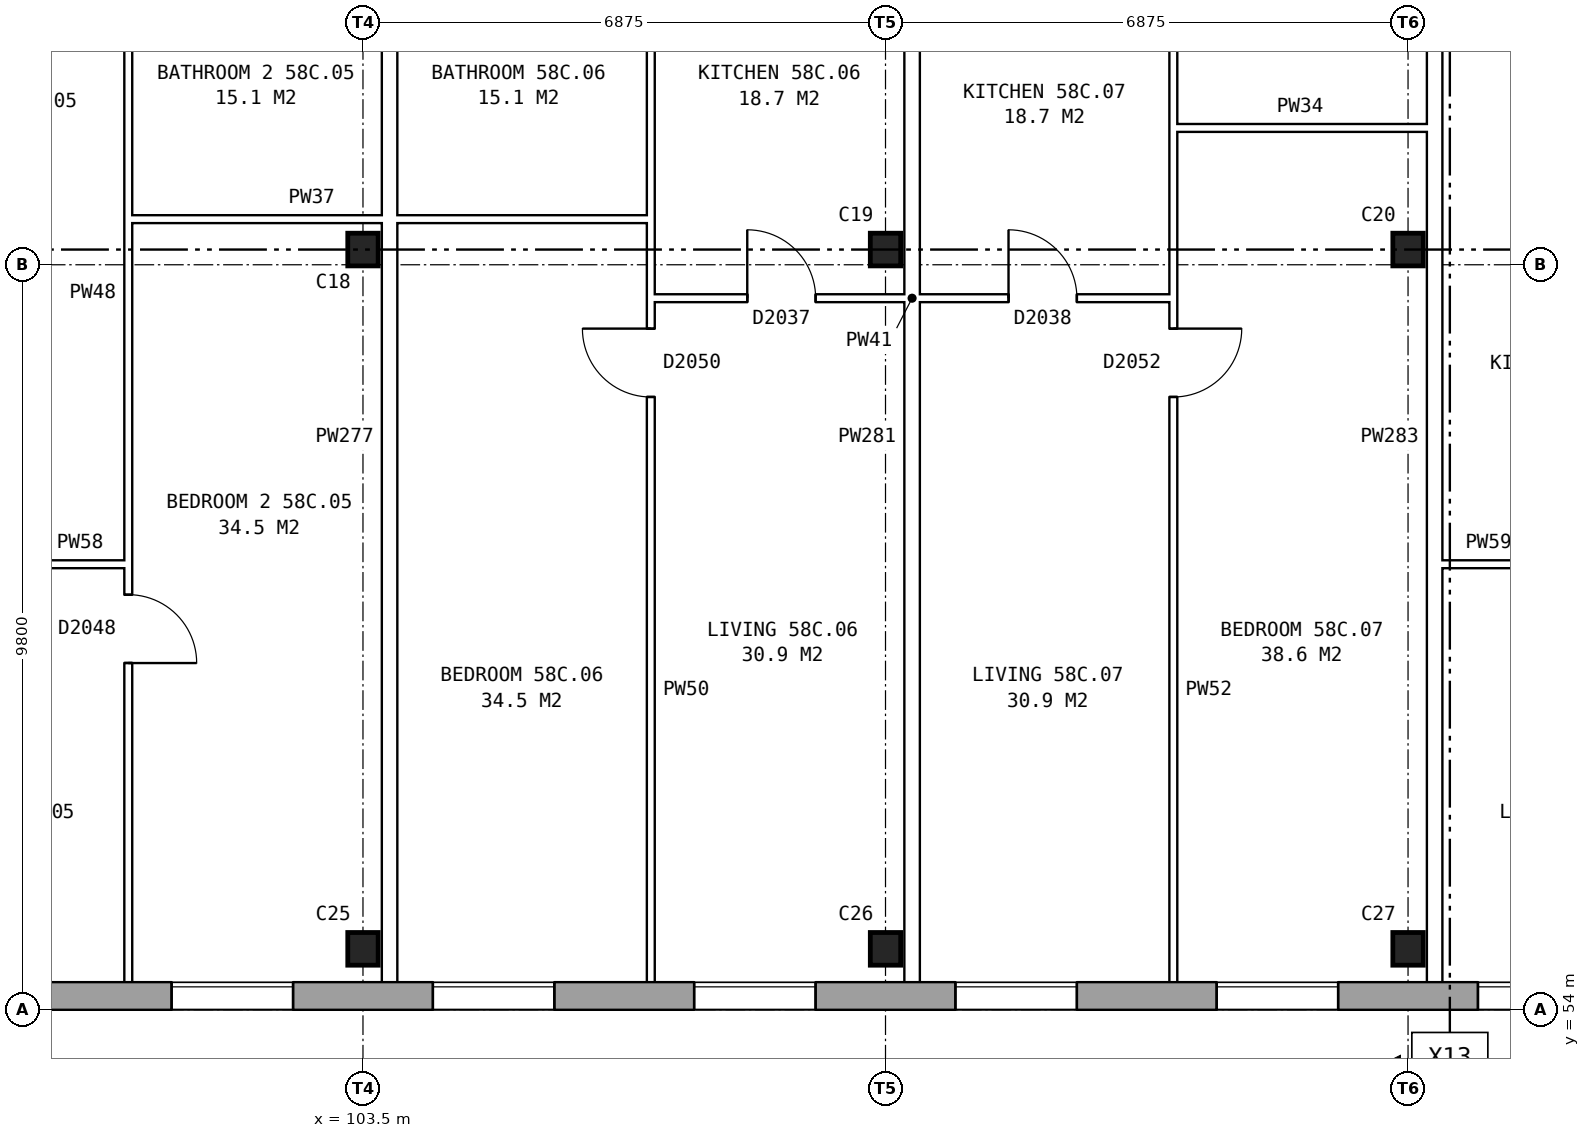
"""IFC4 building model, lengths in metres.
Left out: names, types, materials, properties, quantities, classifications, styles, units other than length and angle.
Written with IfcOpenShell. Run it as: python <this file> out.ifc"""

import sys

from ifc_helpers import new_model, si_unit, direction, frame, frame_2d, origin, origin_2d, place, context, subcontext, project, spatial, rectangle, i_section, extrude, element, fill, save


model = new_model("IFC4")
c1 = context("Model", 3, precision=1e-05, world=origin(), true_north=direction((0.0, 1.0)))
c2 = subcontext(c1, "Body", "Model", "MODEL_VIEW")
j1 = project(units=[si_unit("LENGTHUNIT", "METRE"), si_unit("PLANEANGLEUNIT", "RADIAN")], contexts=[c1])
p1 = place(None, origin())
s1 = spatial("IfcSite", under=j1, at=p1, CompositionType="ELEMENT")
p2 = place(p1, origin())
s2 = spatial("IfcBuilding", under=s1, at=p2, CompositionType="ELEMENT")
p3 = place(p2, frame((0.0, 0.0, 205.9)))
s3 = spatial("IfcBuildingStorey", under=s2, at=p3, CompositionType="ELEMENT", Elevation=205.9)
for number, where, z_axis, x_axis in (
    (1, (103.5, 54.8, 0.0), (0.0, 0.0, 1.0), (1.0, 0.0, 0.0)),
    (2, (110.375, 54.8, 0.0), (0.0, 0.0, 1.0), (1.0, 0.0, 0.0)),
    (3, (117.25, 54.8, 0.0), (0.0, 0.0, 1.0), (1.0, 0.0, 0.0)),
    (4, (103.5, 64.0, 0.0), (0.0, 0.0, 1.0), (1.0, 0.0, 0.0)),
    (5, (110.375, 64.0, 0.0), (0.0, 0.0, 1.0), (1.0, 0.0, 0.0)),
    (6, (117.25, 64.0, 0.0), (0.0, 0.0, 1.0), (1.0, 0.0, 0.0)),
):
    element("IfcColumn", number, at=place(p3, frame(where, z_axis=z_axis, x_axis=x_axis)), inside=s3, PredefinedType="COLUMN", context=c2, shape_type="SweptSolid", body=[
        extrude(i_section(OverallWidth=0.4, OverallDepth=0.43, WebThickness=0.04, FlangeThickness=0.04, at=origin_2d()), origin(), (0.0, 0.0, 1.0), 2.85),
    ])
p4 = place(p3, frame((75.95, 54.18, 0.0), z_axis=(0.0, 0.0, 1.0), x_axis=(1.0, 0.0, 0.0)))
e7 = element("IfcWall", 7, at=p4, inside=s3, PredefinedType="STANDARD", context=c2, shape_type="SweptSolid", body=[
    extrude(rectangle(XDim=55.1, YDim=0.36, at=frame_2d((27.55, 0.0))), origin(), (0.0, 0.0, 1.0), 2.85),
])
p5 = place(p4, frame((0.969, 0.0, 0.8)))
e8 = element("IfcOpeningElement", 8, at=p5, cuts=e7, PredefinedType="OPENING", context=c2, shape_type="SweptSolid", body=[
    extrude(rectangle(XDim=1.6, YDim=1.8, at=frame_2d((0.8, 0.9))), frame((0.0, 0.19, 0.0), z_axis=(0.0, -1.0, 0.0), x_axis=(1.0, 0.0, 0.0)), (0.0, 0.0, 1.0), 0.38),
])
p6 = place(p4, frame((4.406, 0.0, 0.8)))
e9 = element("IfcOpeningElement", 9, at=p6, cuts=e7, PredefinedType="OPENING", context=c2, shape_type="SweptSolid", body=[
    extrude(rectangle(XDim=1.6, YDim=1.8, at=frame_2d((0.8, 0.9))), frame((0.0, 0.19, 0.0), z_axis=(0.0, -1.0, 0.0), x_axis=(1.0, 0.0, 0.0)), (0.0, 0.0, 1.0), 0.38),
])
p7 = place(p4, frame((7.844, 0.0, 0.8)))
e10 = element("IfcOpeningElement", 10, at=p7, cuts=e7, PredefinedType="OPENING", context=c2, shape_type="SweptSolid", body=[
    extrude(rectangle(XDim=1.6, YDim=1.8, at=frame_2d((0.8, 0.9))), frame((0.0, 0.19, 0.0), z_axis=(0.0, -1.0, 0.0), x_axis=(1.0, 0.0, 0.0)), (0.0, 0.0, 1.0), 0.38),
])
p8 = place(p4, frame((11.281, 0.0, 0.8)))
e11 = element("IfcOpeningElement", 11, at=p8, cuts=e7, PredefinedType="OPENING", context=c2, shape_type="SweptSolid", body=[
    extrude(rectangle(XDim=1.6, YDim=1.8, at=frame_2d((0.8, 0.9))), frame((0.0, 0.19, 0.0), z_axis=(0.0, -1.0, 0.0), x_axis=(1.0, 0.0, 0.0)), (0.0, 0.0, 1.0), 0.38),
])
p9 = place(p4, frame((14.719, 0.0, 0.8)))
e12 = element("IfcOpeningElement", 12, at=p9, cuts=e7, PredefinedType="OPENING", context=c2, shape_type="SweptSolid", body=[
    extrude(rectangle(XDim=1.6, YDim=1.8, at=frame_2d((0.8, 0.9))), frame((0.0, 0.19, 0.0), z_axis=(0.0, -1.0, 0.0), x_axis=(1.0, 0.0, 0.0)), (0.0, 0.0, 1.0), 0.38),
])
p10 = place(p4, frame((18.156, 0.0, 0.8)))
e13 = element("IfcOpeningElement", 13, at=p10, cuts=e7, PredefinedType="OPENING", context=c2, shape_type="SweptSolid", body=[
    extrude(rectangle(XDim=1.6, YDim=1.8, at=frame_2d((0.8, 0.9))), frame((0.0, 0.19, 0.0), z_axis=(0.0, -1.0, 0.0), x_axis=(1.0, 0.0, 0.0)), (0.0, 0.0, 1.0), 0.38),
])
p11 = place(p4, frame((21.594, 0.0, 0.8)))
e14 = element("IfcOpeningElement", 14, at=p11, cuts=e7, PredefinedType="OPENING", context=c2, shape_type="SweptSolid", body=[
    extrude(rectangle(XDim=1.6, YDim=1.8, at=frame_2d((0.8, 0.9))), frame((0.0, 0.19, 0.0), z_axis=(0.0, -1.0, 0.0), x_axis=(1.0, 0.0, 0.0)), (0.0, 0.0, 1.0), 0.38),
])
p12 = place(p4, frame((25.031, 0.0, 0.8)))
e15 = element("IfcOpeningElement", 15, at=p12, cuts=e7, PredefinedType="OPENING", context=c2, shape_type="SweptSolid", body=[
    extrude(rectangle(XDim=1.6, YDim=1.8, at=frame_2d((0.8, 0.9))), frame((0.0, 0.19, 0.0), z_axis=(0.0, -1.0, 0.0), x_axis=(1.0, 0.0, 0.0)), (0.0, 0.0, 1.0), 0.38),
])
p13 = place(p4, frame((28.469, 0.0, 0.8)))
e16 = element("IfcOpeningElement", 16, at=p13, cuts=e7, PredefinedType="OPENING", context=c2, shape_type="SweptSolid", body=[
    extrude(rectangle(XDim=1.6, YDim=1.8, at=frame_2d((0.8, 0.9))), frame((0.0, 0.19, 0.0), z_axis=(0.0, -1.0, 0.0), x_axis=(1.0, 0.0, 0.0)), (0.0, 0.0, 1.0), 0.38),
])
p14 = place(p4, frame((31.906, 0.0, 0.8)))
e17 = element("IfcOpeningElement", 17, at=p14, cuts=e7, PredefinedType="OPENING", context=c2, shape_type="SweptSolid", body=[
    extrude(rectangle(XDim=1.6, YDim=1.8, at=frame_2d((0.8, 0.9))), frame((0.0, 0.19, 0.0), z_axis=(0.0, -1.0, 0.0), x_axis=(1.0, 0.0, 0.0)), (0.0, 0.0, 1.0), 0.38),
])
p15 = place(p4, frame((35.344, 0.0, 0.8)))
e18 = element("IfcOpeningElement", 18, at=p15, cuts=e7, PredefinedType="OPENING", context=c2, shape_type="SweptSolid", body=[
    extrude(rectangle(XDim=1.6, YDim=1.8, at=frame_2d((0.8, 0.9))), frame((0.0, 0.19, 0.0), z_axis=(0.0, -1.0, 0.0), x_axis=(1.0, 0.0, 0.0)), (0.0, 0.0, 1.0), 0.38),
])
p16 = place(p4, frame((38.781, 0.0, 0.8)))
e19 = element("IfcOpeningElement", 19, at=p16, cuts=e7, PredefinedType="OPENING", context=c2, shape_type="SweptSolid", body=[
    extrude(rectangle(XDim=1.6, YDim=1.8, at=frame_2d((0.8, 0.9))), frame((0.0, 0.19, 0.0), z_axis=(0.0, -1.0, 0.0), x_axis=(1.0, 0.0, 0.0)), (0.0, 0.0, 1.0), 0.38),
])
p17 = place(p4, frame((42.219, 0.0, 0.8)))
e20 = element("IfcOpeningElement", 20, at=p17, cuts=e7, PredefinedType="OPENING", context=c2, shape_type="SweptSolid", body=[
    extrude(rectangle(XDim=1.6, YDim=1.8, at=frame_2d((0.8, 0.9))), frame((0.0, 0.19, 0.0), z_axis=(0.0, -1.0, 0.0), x_axis=(1.0, 0.0, 0.0)), (0.0, 0.0, 1.0), 0.38),
])
p18 = place(p4, frame((45.656, 0.0, 0.8)))
e21 = element("IfcOpeningElement", 21, at=p18, cuts=e7, PredefinedType="OPENING", context=c2, shape_type="SweptSolid", body=[
    extrude(rectangle(XDim=1.6, YDim=1.8, at=frame_2d((0.8, 0.9))), frame((0.0, 0.19, 0.0), z_axis=(0.0, -1.0, 0.0), x_axis=(1.0, 0.0, 0.0)), (0.0, 0.0, 1.0), 0.38),
])
p19 = place(p4, frame((49.094, 0.0, 0.8)))
e22 = element("IfcOpeningElement", 22, at=p19, cuts=e7, PredefinedType="OPENING", context=c2, shape_type="SweptSolid", body=[
    extrude(rectangle(XDim=1.6, YDim=1.8, at=frame_2d((0.8, 0.9))), frame((0.0, 0.19, 0.0), z_axis=(0.0, -1.0, 0.0), x_axis=(1.0, 0.0, 0.0)), (0.0, 0.0, 1.0), 0.38),
])
p20 = place(p4, frame((52.531, 0.0, 0.8)))
e23 = element("IfcOpeningElement", 23, at=p20, cuts=e7, PredefinedType="OPENING", context=c2, shape_type="SweptSolid", body=[
    extrude(rectangle(XDim=1.6, YDim=1.8, at=frame_2d((0.8, 0.9))), frame((0.0, 0.19, 0.0), z_axis=(0.0, -1.0, 0.0), x_axis=(1.0, 0.0, 0.0)), (0.0, 0.0, 1.0), 0.38),
])
p21 = place(p3, frame((96.975, 59.86, 0.0), z_axis=(0.0, 0.0, 1.0), x_axis=(1.0, 0.0, 0.0)))
e24 = element("IfcWall", 24, at=p21, inside=s3, PredefinedType="PARTITIONING", context=c2, shape_type="SweptSolid", body=[
    extrude(rectangle(XDim=3.437, YDim=0.1, at=frame_2d((1.719, 0.0))), origin(), (0.0, 0.0, 1.0), 2.85),
])
p22 = place(p21, frame((1.269, 0.0, 0.0)))
e25 = element("IfcOpeningElement", 25, at=p22, cuts=e24, PredefinedType="OPENING", context=c2, shape_type="SweptSolid", body=[
    extrude(rectangle(XDim=0.9, YDim=2.1, at=frame_2d((0.45, 1.05))), frame((0.0, 0.06, 0.0), z_axis=(0.0, -1.0, 0.0), x_axis=(1.0, 0.0, 0.0)), (0.0, 0.0, 1.0), 0.12),
])
p23 = place(p3, frame((117.7, 59.86, 0.0), z_axis=(0.0, 0.0, 1.0), x_axis=(1.0, 0.0, 0.0)))
e26 = element("IfcWall", 26, at=p23, inside=s3, PredefinedType="PARTITIONING", context=c2, shape_type="SweptSolid", body=[
    extrude(rectangle(XDim=3.337, YDim=0.1, at=frame_2d((1.668, 0.0))), origin(), (0.0, 0.0, 1.0), 2.85),
])
p24 = place(p23, frame((1.219, 0.0, 0.0)))
e27 = element("IfcOpeningElement", 27, at=p24, cuts=e26, PredefinedType="OPENING", context=c2, shape_type="SweptSolid", body=[
    extrude(rectangle(XDim=0.9, YDim=2.1, at=frame_2d((0.45, 1.05))), frame((0.0, 0.06, 0.0), z_axis=(0.0, -1.0, 0.0), x_axis=(1.0, 0.0, 0.0)), (0.0, 0.0, 1.0), 0.12),
])
p25 = place(p3, frame((107.287, 63.36, 0.0), z_axis=(0.0, 0.0, 1.0), x_axis=(1.0, 0.0, 0.0)))
e28 = element("IfcWall", 28, at=p25, inside=s3, PredefinedType="PARTITIONING", context=c2, shape_type="SweptSolid", body=[
    extrude(rectangle(XDim=6.875, YDim=0.1, at=frame_2d((3.438, 0.0))), origin(), (0.0, 0.0, 1.0), 2.85),
])
p26 = place(p25, frame((1.269, 0.0, 0.0)))
e29 = element("IfcOpeningElement", 29, at=p26, cuts=e28, PredefinedType="OPENING", context=c2, shape_type="SweptSolid", body=[
    extrude(rectangle(XDim=0.9, YDim=2.1, at=frame_2d((0.45, 1.05))), frame((0.0, 0.06, 0.0), z_axis=(0.0, -1.0, 0.0), x_axis=(1.0, 0.0, 0.0)), (0.0, 0.0, 1.0), 0.12),
])
p27 = place(p25, frame((4.707, 0.0, 0.0)))
e30 = element("IfcOpeningElement", 30, at=p27, cuts=e28, PredefinedType="OPENING", context=c2, shape_type="SweptSolid", body=[
    extrude(rectangle(XDim=0.9, YDim=2.1, at=frame_2d((0.45, 1.05))), frame((0.0, 0.06, 0.0), z_axis=(0.0, -1.0, 0.0), x_axis=(1.0, 0.0, 0.0)), (0.0, 0.0, 1.0), 0.12),
])
p28 = place(p3, frame((100.412, 64.4, 0.0), z_axis=(0.0, 0.0, 1.0), x_axis=(1.0, 0.0, 0.0)))
e31 = element("IfcWall", 31, at=p28, inside=s3, PredefinedType="PARTITIONING", context=c2, shape_type="SweptSolid", body=[
    extrude(rectangle(XDim=6.875, YDim=0.1, at=frame_2d((3.438, 0.0))), origin(), (0.0, 0.0, 1.0), 2.85),
])
p29 = place(p3, frame((114.162, 65.6, 0.0), z_axis=(0.0, 0.0, 1.0), x_axis=(1.0, 0.0, 0.0)))
e32 = element("IfcWall", 32, at=p29, inside=s3, PredefinedType="PARTITIONING", context=c2, shape_type="SweptSolid", body=[
    extrude(rectangle(XDim=3.338, YDim=0.1, at=frame_2d((1.669, 0.0))), origin(), (0.0, 0.0, 1.0), 2.85),
])
p30 = place(p3, frame((100.412, 54.36, 0.0), z_axis=(0.0, 0.0, 1.0), x_axis=(0.0, 1.0, 0.0)))
e33 = element("IfcWall", 33, at=p30, inside=s3, PredefinedType="PARTITIONING", context=c2, shape_type="SweptSolid", body=[
    extrude(rectangle(XDim=14.34, YDim=0.1, at=frame_2d((7.17, 0.0))), origin(), (0.0, 0.0, 1.0), 2.85),
])
p31 = place(p30, frame((4.2, 0.0, 0.0)))
e34 = element("IfcOpeningElement", 34, at=p31, cuts=e33, PredefinedType="OPENING", context=c2, shape_type="SweptSolid", body=[
    extrude(rectangle(XDim=0.9, YDim=2.1, at=frame_2d((0.45, 1.05))), frame((0.0, 0.06, 0.0), z_axis=(0.0, -1.0, 0.0), x_axis=(1.0, 0.0, 0.0)), (0.0, 0.0, 1.0), 0.12),
])
p32 = place(p30, frame((13.04, 0.0, 0.0)))
e35 = element("IfcOpeningElement", 35, at=p32, cuts=e33, PredefinedType="OPENING", context=c2, shape_type="SweptSolid", body=[
    extrude(rectangle(XDim=0.9, YDim=2.1, at=frame_2d((0.45, 1.05))), frame((0.0, 0.06, 0.0), z_axis=(0.0, -1.0, 0.0), x_axis=(1.0, 0.0, 0.0)), (0.0, 0.0, 1.0), 0.12),
])
p33 = place(p3, frame((103.85, 54.36, 0.0), z_axis=(0.0, 0.0, 1.0), x_axis=(0.0, 1.0, 0.0)))
e36 = element("IfcWall", 36, at=p33, inside=s3, PredefinedType="PARTITIONING", context=c2, shape_type="SweptSolid", body=[
    extrude(rectangle(XDim=14.34, YDim=0.2, at=frame_2d((7.17, 0.0))), origin(), (0.0, 0.0, 1.0), 2.85),
])
p34 = place(p3, frame((107.287, 54.36, 0.0), z_axis=(0.0, 0.0, 1.0), x_axis=(0.0, 1.0, 0.0)))
e37 = element("IfcWall", 37, at=p34, inside=s3, PredefinedType="PARTITIONING", context=c2, shape_type="SweptSolid", body=[
    extrude(rectangle(XDim=14.34, YDim=0.1, at=frame_2d((7.17, 0.0))), origin(), (0.0, 0.0, 1.0), 2.85),
])
p35 = place(p34, frame((7.7, 0.0, 0.0)))
e38 = element("IfcOpeningElement", 38, at=p35, cuts=e37, PredefinedType="OPENING", context=c2, shape_type="SweptSolid", body=[
    extrude(rectangle(XDim=0.9, YDim=2.1, at=frame_2d((0.45, 1.05))), frame((0.0, 0.06, 0.0), z_axis=(0.0, -1.0, 0.0), x_axis=(1.0, 0.0, 0.0)), (0.0, 0.0, 1.0), 0.12),
])
p36 = place(p34, frame((13.04, 0.0, 0.0)))
e39 = element("IfcOpeningElement", 39, at=p36, cuts=e37, PredefinedType="OPENING", context=c2, shape_type="SweptSolid", body=[
    extrude(rectangle(XDim=0.9, YDim=2.1, at=frame_2d((0.45, 1.05))), frame((0.0, 0.06, 0.0), z_axis=(0.0, -1.0, 0.0), x_axis=(1.0, 0.0, 0.0)), (0.0, 0.0, 1.0), 0.12),
])
p37 = place(p3, frame((110.725, 54.36, 0.0), z_axis=(0.0, 0.0, 1.0), x_axis=(0.0, 1.0, 0.0)))
e40 = element("IfcWall", 40, at=p37, inside=s3, PredefinedType="PARTITIONING", context=c2, shape_type="SweptSolid", body=[
    extrude(rectangle(XDim=14.34, YDim=0.2, at=frame_2d((7.17, 0.0))), origin(), (0.0, 0.0, 1.0), 2.85),
])
p38 = place(p3, frame((114.162, 54.36, 0.0), z_axis=(0.0, 0.0, 1.0), x_axis=(0.0, 1.0, 0.0)))
e41 = element("IfcWall", 41, at=p38, inside=s3, PredefinedType="PARTITIONING", context=c2, shape_type="SweptSolid", body=[
    extrude(rectangle(XDim=14.34, YDim=0.1, at=frame_2d((7.17, 0.0))), origin(), (0.0, 0.0, 1.0), 2.85),
])
p39 = place(p38, frame((7.7, 0.0, 0.0)))
e42 = element("IfcOpeningElement", 42, at=p39, cuts=e41, PredefinedType="OPENING", context=c2, shape_type="SweptSolid", body=[
    extrude(rectangle(XDim=0.9, YDim=2.1, at=frame_2d((0.45, 1.05))), frame((0.0, 0.06, 0.0), z_axis=(0.0, -1.0, 0.0), x_axis=(1.0, 0.0, 0.0)), (0.0, 0.0, 1.0), 0.12),
])
p40 = place(p38, frame((13.04, 0.0, 0.0)))
e43 = element("IfcOpeningElement", 43, at=p40, cuts=e41, PredefinedType="OPENING", context=c2, shape_type="SweptSolid", body=[
    extrude(rectangle(XDim=0.9, YDim=2.1, at=frame_2d((0.45, 1.05))), frame((0.0, 0.06, 0.0), z_axis=(0.0, -1.0, 0.0), x_axis=(1.0, 0.0, 0.0)), (0.0, 0.0, 1.0), 0.12),
])
p41 = place(p3, frame((117.6, 54.36, 0.0), z_axis=(0.0, 0.0, 1.0), x_axis=(0.0, 1.0, 0.0)))
e44 = element("IfcWall", 44, at=p41, inside=s3, PredefinedType="PARTITIONING", context=c2, shape_type="SweptSolid", body=[
    extrude(rectangle(XDim=14.34, YDim=0.2, at=frame_2d((7.17, 0.0))), origin(), (0.0, 0.0, 1.0), 2.85),
])
p42 = place(p12, origin())
e45 = element("IfcWindow", 45, at=p42, inside=s3, PartitioningType="SINGLE_PANEL", PredefinedType="WINDOW", context=c2, shape_type="SweptSolid", body=[
    extrude(rectangle(XDim=1.6, YDim=1.8, at=frame_2d((0.8, 0.9))), frame((0.0, 0.15, 0.0), z_axis=(0.0, -1.0, 0.0), x_axis=(1.0, 0.0, 0.0)), (0.0, 0.0, 1.0), 0.06),
])
fill(e15, e45)
p43 = place(p13, origin())
e46 = element("IfcWindow", 46, at=p43, inside=s3, PartitioningType="SINGLE_PANEL", PredefinedType="WINDOW", context=c2, shape_type="SweptSolid", body=[
    extrude(rectangle(XDim=1.6, YDim=1.8, at=frame_2d((0.8, 0.9))), frame((0.0, 0.15, 0.0), z_axis=(0.0, -1.0, 0.0), x_axis=(1.0, 0.0, 0.0)), (0.0, 0.0, 1.0), 0.06),
])
fill(e16, e46)
p44 = place(p14, origin())
e47 = element("IfcWindow", 47, at=p44, inside=s3, PartitioningType="SINGLE_PANEL", PredefinedType="WINDOW", context=c2, shape_type="SweptSolid", body=[
    extrude(rectangle(XDim=1.6, YDim=1.8, at=frame_2d((0.8, 0.9))), frame((0.0, 0.15, 0.0), z_axis=(0.0, -1.0, 0.0), x_axis=(1.0, 0.0, 0.0)), (0.0, 0.0, 1.0), 0.06),
])
fill(e17, e47)
p45 = place(p15, origin())
e48 = element("IfcWindow", 48, at=p45, inside=s3, PartitioningType="SINGLE_PANEL", PredefinedType="WINDOW", context=c2, shape_type="SweptSolid", body=[
    extrude(rectangle(XDim=1.6, YDim=1.8, at=frame_2d((0.8, 0.9))), frame((0.0, 0.15, 0.0), z_axis=(0.0, -1.0, 0.0), x_axis=(1.0, 0.0, 0.0)), (0.0, 0.0, 1.0), 0.06),
])
fill(e18, e48)
p46 = place(p16, origin())
e49 = element("IfcWindow", 49, at=p46, inside=s3, PartitioningType="SINGLE_PANEL", PredefinedType="WINDOW", context=c2, shape_type="SweptSolid", body=[
    extrude(rectangle(XDim=1.6, YDim=1.8, at=frame_2d((0.8, 0.9))), frame((0.0, 0.15, 0.0), z_axis=(0.0, -1.0, 0.0), x_axis=(1.0, 0.0, 0.0)), (0.0, 0.0, 1.0), 0.06),
])
fill(e19, e49)
p47 = place(p17, origin())
e50 = element("IfcWindow", 50, at=p47, inside=s3, PartitioningType="SINGLE_PANEL", PredefinedType="WINDOW", context=c2, shape_type="SweptSolid", body=[
    extrude(rectangle(XDim=1.6, YDim=1.8, at=frame_2d((0.8, 0.9))), frame((0.0, 0.15, 0.0), z_axis=(0.0, -1.0, 0.0), x_axis=(1.0, 0.0, 0.0)), (0.0, 0.0, 1.0), 0.06),
])
fill(e20, e50)
p48 = place(p31, frame((0.9, 0.0, 0.0), z_axis=(0.0, 0.0, 1.0), x_axis=(-1.0, 0.0, 0.0)))
e51 = element("IfcDoor", 51, at=p48, inside=s3, OperationType="SINGLE_SWING_RIGHT", PredefinedType="DOOR", context=c2, shape_type="SweptSolid", body=[
    extrude(rectangle(XDim=0.9, YDim=2.1, at=frame_2d((0.45, 1.05))), frame((0.0, 0.025, 0.0), z_axis=(0.0, -1.0, 0.0), x_axis=(1.0, 0.0, 0.0)), (0.0, 0.0, 1.0), 0.05),
])
fill(e34, e51)
p49 = place(p35, origin())
e52 = element("IfcDoor", 52, at=p49, inside=s3, OperationType="SINGLE_SWING_RIGHT", PredefinedType="DOOR", context=c2, shape_type="SweptSolid", body=[
    extrude(rectangle(XDim=0.9, YDim=2.1, at=frame_2d((0.45, 1.05))), frame((0.0, 0.025, 0.0), z_axis=(0.0, -1.0, 0.0), x_axis=(1.0, 0.0, 0.0)), (0.0, 0.0, 1.0), 0.05),
])
fill(e38, e52)
p50 = place(p26, origin())
e53 = element("IfcDoor", 53, at=p50, inside=s3, OperationType="SINGLE_SWING_LEFT", PredefinedType="DOOR", context=c2, shape_type="SweptSolid", body=[
    extrude(rectangle(XDim=0.9, YDim=2.1, at=frame_2d((0.45, 1.05))), frame((0.0, 0.025, 0.0), z_axis=(0.0, -1.0, 0.0), x_axis=(1.0, 0.0, 0.0)), (0.0, 0.0, 1.0), 0.05),
])
fill(e29, e53)
p51 = place(p39, frame((0.9, 0.0, 0.0), z_axis=(0.0, 0.0, 1.0), x_axis=(-1.0, 0.0, 0.0)))
e54 = element("IfcDoor", 54, at=p51, inside=s3, OperationType="SINGLE_SWING_LEFT", PredefinedType="DOOR", context=c2, shape_type="SweptSolid", body=[
    extrude(rectangle(XDim=0.9, YDim=2.1, at=frame_2d((0.45, 1.05))), frame((0.0, 0.025, 0.0), z_axis=(0.0, -1.0, 0.0), x_axis=(1.0, 0.0, 0.0)), (0.0, 0.0, 1.0), 0.05),
])
fill(e42, e54)
p52 = place(p27, origin())
e55 = element("IfcDoor", 55, at=p52, inside=s3, OperationType="SINGLE_SWING_LEFT", PredefinedType="DOOR", context=c2, shape_type="SweptSolid", body=[
    extrude(rectangle(XDim=0.9, YDim=2.1, at=frame_2d((0.45, 1.05))), frame((0.0, 0.025, 0.0), z_axis=(0.0, -1.0, 0.0), x_axis=(1.0, 0.0, 0.0)), (0.0, 0.0, 1.0), 0.05),
])
fill(e30, e55)
save(model, sys.argv[1])
